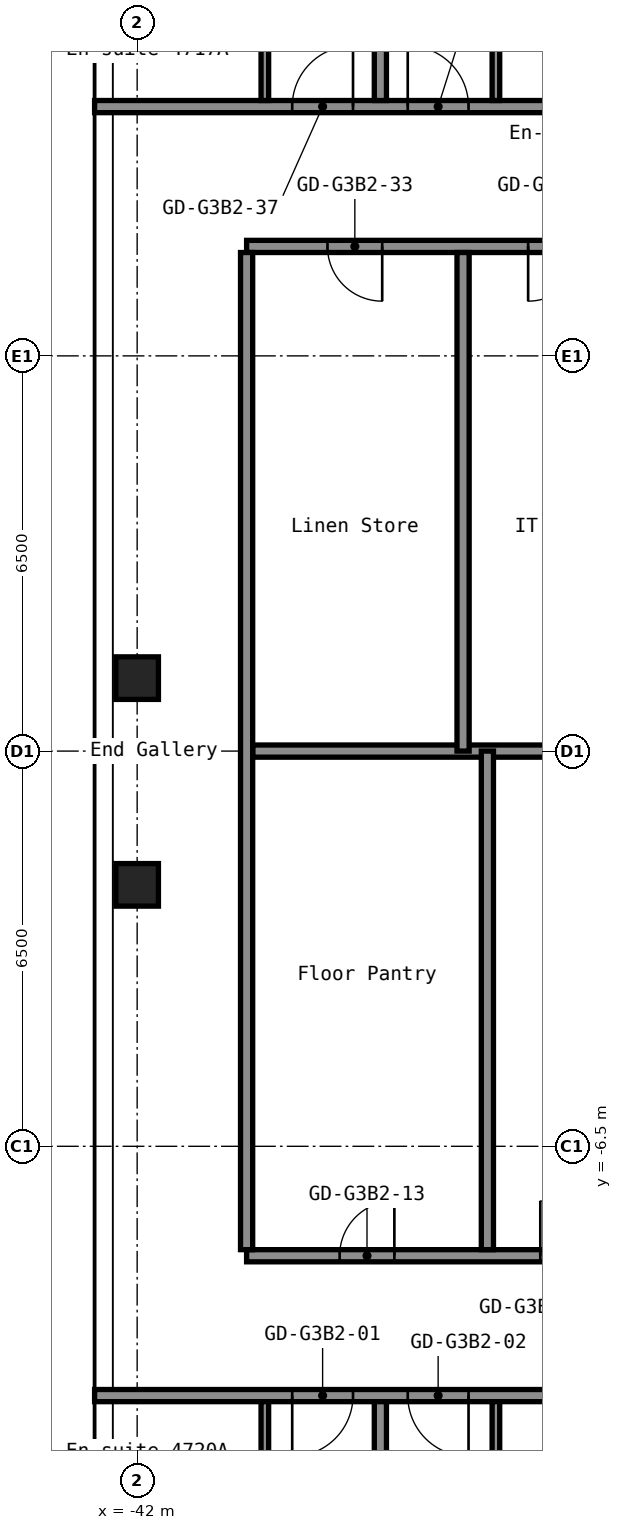
"""IFC4 building model, lengths in metres.
Left out: names, types, materials, properties, quantities, classifications, styles, units other than length and angle.
Written with IfcOpenShell. Run it as: python <this file> out.ifc"""

import sys

from ifc_helpers import new_model, si_unit, direction, frame, frame_2d, origin, origin_2d, place, context, subcontext, project, spatial, rectangle, hollow_rectangle, extrude, element, fill, save


model = new_model("IFC4")
c1 = context("Model", 3, precision=1e-05, world=origin(), true_north=direction((0.0, 1.0)))
c2 = subcontext(c1, "Body", "Model", "MODEL_VIEW")
j1 = project(units=[si_unit("LENGTHUNIT", "METRE"), si_unit("PLANEANGLEUNIT", "RADIAN")], contexts=[c1])
p1 = place(None, origin())
s1 = spatial("IfcSite", under=j1, at=p1, CompositionType="ELEMENT")
p2 = place(p1, origin())
s2 = spatial("IfcBuilding", under=s1, at=p2, CompositionType="ELEMENT")
p3 = place(p2, frame((0.0, 0.0, 166.2)))
s3 = spatial("IfcBuildingStorey", under=s2, at=p3, CompositionType="ELEMENT", Elevation=166.2)
for number, where, z_axis, x_axis in (
    (1, (-42.0, -2.2, 0.0), (0.0, 0.0, 1.0), (1.0, 0.0, 0.0)),
    (2, (-42.0, 1.2, 0.0), (0.0, 0.0, 1.0), (1.0, 0.0, 0.0)),
):
    element("IfcColumn", number, at=place(p3, frame(where, z_axis=z_axis, x_axis=x_axis)), inside=s3, PredefinedType="COLUMN", context=c2, shape_type="SweptSolid", body=[
        extrude(hollow_rectangle(XDim=0.7, YDim=0.7, WallThickness=0.028, at=origin_2d()), origin(), (0.0, 0.0, 1.0), 2.75),
    ])
p4 = place(p3, frame((-42.7, -10.6, 0.0), z_axis=(0.0, 0.0, 1.0), x_axis=(1.0, 0.0, 0.0)))
e3 = element("IfcWall", 3, at=p4, inside=s3, PredefinedType="PARTITIONING", context=c2, shape_type="SweptSolid", body=[
    extrude(rectangle(XDim=25.9, YDim=0.2, at=frame_2d((12.95, 0.0))), origin(), (0.0, 0.0, 1.0), 2.75),
])
p5 = place(p4, frame((3.25, 0.0, 0.0)))
e4 = element("IfcOpeningElement", 4, at=p5, cuts=e3, PredefinedType="OPENING", context=c2, shape_type="SweptSolid", body=[
    extrude(rectangle(XDim=1.0, YDim=2.1, at=frame_2d((0.5, 1.05))), frame((0.0, 0.11, 0.0), z_axis=(0.0, -1.0, 0.0), x_axis=(1.0, 0.0, 0.0)), (0.0, 0.0, 1.0), 0.22),
])
p6 = place(p4, frame((5.15, 0.0, 0.0)))
e5 = element("IfcOpeningElement", 5, at=p6, cuts=e3, PredefinedType="OPENING", context=c2, shape_type="SweptSolid", body=[
    extrude(rectangle(XDim=1.0, YDim=2.1, at=frame_2d((0.5, 1.05))), frame((0.0, 0.11, 0.0), z_axis=(0.0, -1.0, 0.0), x_axis=(1.0, 0.0, 0.0)), (0.0, 0.0, 1.0), 0.22),
])
p7 = place(p4, frame((11.95, 0.0, 0.0)))
e6 = element("IfcOpeningElement", 6, at=p7, cuts=e3, PredefinedType="OPENING", context=c2, shape_type="SweptSolid", body=[
    extrude(rectangle(XDim=1.0, YDim=2.1, at=frame_2d((0.5, 1.05))), frame((0.0, 0.11, 0.0), z_axis=(0.0, -1.0, 0.0), x_axis=(1.0, 0.0, 0.0)), (0.0, 0.0, 1.0), 0.22),
])
p8 = place(p4, frame((13.65, 0.0, 0.0)))
e7 = element("IfcOpeningElement", 7, at=p8, cuts=e3, PredefinedType="OPENING", context=c2, shape_type="SweptSolid", body=[
    extrude(rectangle(XDim=1.0, YDim=2.1, at=frame_2d((0.5, 1.05))), frame((0.0, 0.11, 0.0), z_axis=(0.0, -1.0, 0.0), x_axis=(1.0, 0.0, 0.0)), (0.0, 0.0, 1.0), 0.22),
])
p9 = place(p4, frame((20.35, 0.0, 0.0)))
e8 = element("IfcOpeningElement", 8, at=p9, cuts=e3, PredefinedType="OPENING", context=c2, shape_type="SweptSolid", body=[
    extrude(rectangle(XDim=1.0, YDim=2.1, at=frame_2d((0.5, 1.05))), frame((0.0, 0.11, 0.0), z_axis=(0.0, -1.0, 0.0), x_axis=(1.0, 0.0, 0.0)), (0.0, 0.0, 1.0), 0.22),
])
p10 = place(p4, frame((22.05, 0.0, 0.0)))
e9 = element("IfcOpeningElement", 9, at=p10, cuts=e3, PredefinedType="OPENING", context=c2, shape_type="SweptSolid", body=[
    extrude(rectangle(XDim=1.0, YDim=2.1, at=frame_2d((0.5, 1.05))), frame((0.0, 0.11, 0.0), z_axis=(0.0, -1.0, 0.0), x_axis=(1.0, 0.0, 0.0)), (0.0, 0.0, 1.0), 0.22),
])
p11 = place(p3, frame((-40.2, -8.3, 0.0), z_axis=(0.0, 0.0, 1.0), x_axis=(1.0, 0.0, 0.0)))
e10 = element("IfcWall", 10, at=p11, inside=s3, PredefinedType="PARTITIONING", context=c2, shape_type="SweptSolid", body=[
    extrude(rectangle(XDim=6.6, YDim=0.2, at=frame_2d((3.3, 0.0))), origin(), (0.0, 0.0, 1.0), 2.75),
])
p12 = place(p11, frame((1.53, 0.0, 0.0)))
e11 = element("IfcOpeningElement", 11, at=p12, cuts=e10, PredefinedType="OPENING", context=c2, shape_type="SweptSolid", body=[
    extrude(rectangle(XDim=0.9, YDim=2.1, at=frame_2d((0.45, 1.05))), frame((0.0, 0.11, 0.0), z_axis=(0.0, -1.0, 0.0), x_axis=(1.0, 0.0, 0.0)), (0.0, 0.0, 1.0), 0.22),
])
p13 = place(p11, frame((4.83, 0.0, 0.0)))
e12 = element("IfcOpeningElement", 12, at=p13, cuts=e10, PredefinedType="OPENING", context=c2, shape_type="SweptSolid", body=[
    extrude(rectangle(XDim=0.9, YDim=2.1, at=frame_2d((0.45, 1.05))), frame((0.0, 0.11, 0.0), z_axis=(0.0, -1.0, 0.0), x_axis=(1.0, 0.0, 0.0)), (0.0, 0.0, 1.0), 0.22),
])
p14 = place(p3, frame((-40.1, 0.0, 0.0), z_axis=(0.0, 0.0, 1.0), x_axis=(1.0, 0.0, 0.0)))
e13 = element("IfcWall", 13, at=p14, inside=s3, PredefinedType="PARTITIONING", context=c2, shape_type="SweptSolid", body=[
    extrude(rectangle(XDim=6.5, YDim=0.2, at=frame_2d((3.25, 0.0))), origin(), (0.0, 0.0, 1.0), 2.75),
])
p15 = place(p3, frame((-40.2, 8.3, 0.0), z_axis=(0.0, 0.0, 1.0), x_axis=(1.0, 0.0, 0.0)))
e14 = element("IfcWall", 14, at=p15, inside=s3, PredefinedType="PARTITIONING", context=c2, shape_type="SweptSolid", body=[
    extrude(rectangle(XDim=6.6, YDim=0.2, at=frame_2d((3.3, 0.0))), origin(), (0.0, 0.0, 1.0), 2.75),
])
p16 = place(p15, frame((1.33, 0.0, 0.0)))
e15 = element("IfcOpeningElement", 15, at=p16, cuts=e14, PredefinedType="OPENING", context=c2, shape_type="SweptSolid", body=[
    extrude(rectangle(XDim=0.9, YDim=2.1, at=frame_2d((0.45, 1.05))), frame((0.0, 0.11, 0.0), z_axis=(0.0, -1.0, 0.0), x_axis=(1.0, 0.0, 0.0)), (0.0, 0.0, 1.0), 0.22),
])
p17 = place(p15, frame((4.63, 0.0, 0.0)))
e16 = element("IfcOpeningElement", 16, at=p17, cuts=e14, PredefinedType="OPENING", context=c2, shape_type="SweptSolid", body=[
    extrude(rectangle(XDim=0.9, YDim=2.1, at=frame_2d((0.45, 1.05))), frame((0.0, 0.11, 0.0), z_axis=(0.0, -1.0, 0.0), x_axis=(1.0, 0.0, 0.0)), (0.0, 0.0, 1.0), 0.22),
])
p18 = place(p3, frame((-42.7, 10.6, 0.0), z_axis=(0.0, 0.0, 1.0), x_axis=(1.0, 0.0, 0.0)))
e17 = element("IfcWall", 17, at=p18, inside=s3, PredefinedType="PARTITIONING", context=c2, shape_type="SweptSolid", body=[
    extrude(rectangle(XDim=25.9, YDim=0.2, at=frame_2d((12.95, 0.0))), origin(), (0.0, 0.0, 1.0), 2.75),
])
p19 = place(p18, frame((3.25, 0.0, 0.0)))
e18 = element("IfcOpeningElement", 18, at=p19, cuts=e17, PredefinedType="OPENING", context=c2, shape_type="SweptSolid", body=[
    extrude(rectangle(XDim=1.0, YDim=2.1, at=frame_2d((0.5, 1.05))), frame((0.0, 0.11, 0.0), z_axis=(0.0, -1.0, 0.0), x_axis=(1.0, 0.0, 0.0)), (0.0, 0.0, 1.0), 0.22),
])
p20 = place(p18, frame((5.15, 0.0, 0.0)))
e19 = element("IfcOpeningElement", 19, at=p20, cuts=e17, PredefinedType="OPENING", context=c2, shape_type="SweptSolid", body=[
    extrude(rectangle(XDim=1.0, YDim=2.1, at=frame_2d((0.5, 1.05))), frame((0.0, 0.11, 0.0), z_axis=(0.0, -1.0, 0.0), x_axis=(1.0, 0.0, 0.0)), (0.0, 0.0, 1.0), 0.22),
])
p21 = place(p18, frame((11.95, 0.0, 0.0)))
e20 = element("IfcOpeningElement", 20, at=p21, cuts=e17, PredefinedType="OPENING", context=c2, shape_type="SweptSolid", body=[
    extrude(rectangle(XDim=1.0, YDim=2.1, at=frame_2d((0.5, 1.05))), frame((0.0, 0.11, 0.0), z_axis=(0.0, -1.0, 0.0), x_axis=(1.0, 0.0, 0.0)), (0.0, 0.0, 1.0), 0.22),
])
p22 = place(p18, frame((13.65, 0.0, 0.0)))
e21 = element("IfcOpeningElement", 21, at=p22, cuts=e17, PredefinedType="OPENING", context=c2, shape_type="SweptSolid", body=[
    extrude(rectangle(XDim=1.0, YDim=2.1, at=frame_2d((0.5, 1.05))), frame((0.0, 0.11, 0.0), z_axis=(0.0, -1.0, 0.0), x_axis=(1.0, 0.0, 0.0)), (0.0, 0.0, 1.0), 0.22),
])
p23 = place(p18, frame((20.35, 0.0, 0.0)))
e22 = element("IfcOpeningElement", 22, at=p23, cuts=e17, PredefinedType="OPENING", context=c2, shape_type="SweptSolid", body=[
    extrude(rectangle(XDim=1.0, YDim=2.1, at=frame_2d((0.5, 1.05))), frame((0.0, 0.11, 0.0), z_axis=(0.0, -1.0, 0.0), x_axis=(1.0, 0.0, 0.0)), (0.0, 0.0, 1.0), 0.22),
])
p24 = place(p18, frame((22.05, 0.0, 0.0)))
e23 = element("IfcOpeningElement", 23, at=p24, cuts=e17, PredefinedType="OPENING", context=c2, shape_type="SweptSolid", body=[
    extrude(rectangle(XDim=1.0, YDim=2.1, at=frame_2d((0.5, 1.05))), frame((0.0, 0.11, 0.0), z_axis=(0.0, -1.0, 0.0), x_axis=(1.0, 0.0, 0.0)), (0.0, 0.0, 1.0), 0.22),
])
p25 = place(p3, frame((-40.2, -8.2, 0.0), z_axis=(0.0, 0.0, 1.0), x_axis=(0.0, 1.0, 0.0)))
e24 = element("IfcWall", 24, at=p25, inside=s3, PredefinedType="PARTITIONING", context=c2, shape_type="SweptSolid", body=[
    extrude(rectangle(XDim=16.4, YDim=0.2, at=frame_2d((8.2, 0.0))), origin(), (0.0, 0.0, 1.0), 2.75),
])
p26 = place(p3, frame((-39.9, -13.6, 0.0), z_axis=(0.0, 0.0, 1.0), x_axis=(0.0, 1.0, 0.0)))
e25 = element("IfcWall", 25, at=p26, inside=s3, PredefinedType="PARTITIONING", context=c2, shape_type="SweptSolid", body=[
    extrude(rectangle(XDim=2.9, YDim=0.125, at=frame_2d((1.45, 0.0))), origin(), (0.0, 0.0, 1.0), 2.75),
])
p27 = place(p26, frame((0.6, 0.0, 0.0)))
e26 = element("IfcOpeningElement", 26, at=p27, cuts=e25, PredefinedType="OPENING", context=c2, shape_type="SweptSolid", body=[
    extrude(rectangle(XDim=0.8, YDim=2.1, at=frame_2d((0.4, 1.05))), frame((0.0, 0.073, 0.0), z_axis=(0.0, -1.0, 0.0), x_axis=(1.0, 0.0, 0.0)), (0.0, 0.0, 1.0), 0.145),
])
p28 = place(p3, frame((-39.9, 10.7, 0.0), z_axis=(0.0, 0.0, 1.0), x_axis=(0.0, 1.0, 0.0)))
e27 = element("IfcWall", 27, at=p28, inside=s3, PredefinedType="PARTITIONING", context=c2, shape_type="SweptSolid", body=[
    extrude(rectangle(XDim=2.9, YDim=0.125, at=frame_2d((1.45, 0.0))), origin(), (0.0, 0.0, 1.0), 2.75),
])
p29 = place(p28, frame((1.5, 0.0, 0.0)))
e28 = element("IfcOpeningElement", 28, at=p29, cuts=e27, PredefinedType="OPENING", context=c2, shape_type="SweptSolid", body=[
    extrude(rectangle(XDim=0.8, YDim=2.1, at=frame_2d((0.4, 1.05))), frame((0.0, 0.073, 0.0), z_axis=(0.0, -1.0, 0.0), x_axis=(1.0, 0.0, 0.0)), (0.0, 0.0, 1.0), 0.145),
])
p30 = place(p3, frame((-38.0, -19.3, 0.0), z_axis=(0.0, 0.0, 1.0), x_axis=(0.0, 1.0, 0.0)))
e29 = element("IfcWall", 29, at=p30, inside=s3, PredefinedType="PARTITIONING", context=c2, shape_type="SweptSolid", body=[
    extrude(rectangle(XDim=8.6, YDim=0.2, at=frame_2d((4.3, 0.0))), origin(), (0.0, 0.0, 1.0), 2.75),
])
p31 = place(p3, frame((-38.0, 10.7, 0.0), z_axis=(0.0, 0.0, 1.0), x_axis=(0.0, 1.0, 0.0)))
e30 = element("IfcWall", 30, at=p31, inside=s3, PredefinedType="PARTITIONING", context=c2, shape_type="SweptSolid", body=[
    extrude(rectangle(XDim=7.6, YDim=0.2, at=frame_2d((3.8, 0.0))), origin(), (0.0, 0.0, 1.0), 2.75),
])
for number, where, z_axis, x_axis in (
    (31, (-36.64, 0.0, 0.0), (0.0, 0.0, 1.0), (0.0, 1.0, 0.0)),
    (32, (-36.24, -8.2, 0.0), (0.0, 0.0, 1.0), (0.0, 1.0, 0.0)),
):
    element("IfcWall", number, at=place(p3, frame(where, z_axis=z_axis, x_axis=x_axis)), inside=s3, PredefinedType="PARTITIONING", context=c2, shape_type="SweptSolid", body=[
        extrude(rectangle(XDim=8.2, YDim=0.2, at=frame_2d((4.1, 0.0))), origin(), (0.0, 0.0, 1.0), 2.75),
    ])
p32 = place(p3, frame((-36.1, -13.6, 0.0), z_axis=(0.0, 0.0, 1.0), x_axis=(0.0, 1.0, 0.0)))
e33 = element("IfcWall", 33, at=p32, inside=s3, PredefinedType="PARTITIONING", context=c2, shape_type="SweptSolid", body=[
    extrude(rectangle(XDim=2.9, YDim=0.125, at=frame_2d((1.45, 0.0))), origin(), (0.0, 0.0, 1.0), 2.75),
])
p33 = place(p32, frame((0.6, 0.0, 0.0)))
e34 = element("IfcOpeningElement", 34, at=p33, cuts=e33, PredefinedType="OPENING", context=c2, shape_type="SweptSolid", body=[
    extrude(rectangle(XDim=0.8, YDim=2.1, at=frame_2d((0.4, 1.05))), frame((0.0, 0.073, 0.0), z_axis=(0.0, -1.0, 0.0), x_axis=(1.0, 0.0, 0.0)), (0.0, 0.0, 1.0), 0.145),
])
p34 = place(p3, frame((-36.1, 10.7, 0.0), z_axis=(0.0, 0.0, 1.0), x_axis=(0.0, 1.0, 0.0)))
e35 = element("IfcWall", 35, at=p34, inside=s3, PredefinedType="PARTITIONING", context=c2, shape_type="SweptSolid", body=[
    extrude(rectangle(XDim=2.9, YDim=0.125, at=frame_2d((1.45, 0.0))), origin(), (0.0, 0.0, 1.0), 2.75),
])
p35 = place(p34, frame((1.5, 0.0, 0.0)))
e36 = element("IfcOpeningElement", 36, at=p35, cuts=e35, PredefinedType="OPENING", context=c2, shape_type="SweptSolid", body=[
    extrude(rectangle(XDim=0.8, YDim=2.1, at=frame_2d((0.4, 1.05))), frame((0.0, 0.073, 0.0), z_axis=(0.0, -1.0, 0.0), x_axis=(1.0, 0.0, 0.0)), (0.0, 0.0, 1.0), 0.145),
])
p36 = place(p5, origin())
e37 = element("IfcDoor", 37, at=p36, inside=s3, OperationType="SINGLE_SWING_LEFT", PredefinedType="DOOR", context=c2, shape_type="SweptSolid", body=[
    extrude(rectangle(XDim=1.0, YDim=2.1, at=frame_2d((0.5, 1.05))), frame((0.0, 0.025, 0.0), z_axis=(0.0, -1.0, 0.0), x_axis=(1.0, 0.0, 0.0)), (0.0, 0.0, 1.0), 0.05),
])
fill(e4, e37)
p37 = place(p6, origin())
e38 = element("IfcDoor", 38, at=p37, inside=s3, OperationType="SINGLE_SWING_RIGHT", PredefinedType="DOOR", context=c2, shape_type="SweptSolid", body=[
    extrude(rectangle(XDim=1.0, YDim=2.1, at=frame_2d((0.5, 1.05))), frame((0.0, 0.025, 0.0), z_axis=(0.0, -1.0, 0.0), x_axis=(1.0, 0.0, 0.0)), (0.0, 0.0, 1.0), 0.05),
])
fill(e5, e38)
p38 = place(p12, origin())
e39 = element("IfcDoor", 39, at=p38, inside=s3, OperationType="SINGLE_SWING_LEFT", PredefinedType="DOOR", context=c2, shape_type="SweptSolid", body=[
    extrude(rectangle(XDim=0.9, YDim=2.1, at=frame_2d((0.45, 1.05))), frame((0.0, 0.025, 0.0), z_axis=(0.0, -1.0, 0.0), x_axis=(1.0, 0.0, 0.0)), (0.0, 0.0, 1.0), 0.05),
])
fill(e11, e39)
p39 = place(p13, origin())
e40 = element("IfcDoor", 40, at=p39, inside=s3, OperationType="SINGLE_SWING_RIGHT", PredefinedType="DOOR", context=c2, shape_type="SweptSolid", body=[
    extrude(rectangle(XDim=0.9, YDim=2.1, at=frame_2d((0.45, 1.05))), frame((0.0, 0.025, 0.0), z_axis=(0.0, -1.0, 0.0), x_axis=(1.0, 0.0, 0.0)), (0.0, 0.0, 1.0), 0.05),
])
fill(e12, e40)
p40 = place(p16, origin())
e41 = element("IfcDoor", 41, at=p40, inside=s3, OperationType="SINGLE_SWING_RIGHT", PredefinedType="DOOR", context=c2, shape_type="SweptSolid", body=[
    extrude(rectangle(XDim=0.9, YDim=2.1, at=frame_2d((0.45, 1.05))), frame((0.0, 0.025, 0.0), z_axis=(0.0, -1.0, 0.0), x_axis=(1.0, 0.0, 0.0)), (0.0, 0.0, 1.0), 0.05),
])
fill(e15, e41)
p41 = place(p17, origin())
e42 = element("IfcDoor", 42, at=p41, inside=s3, OperationType="SINGLE_SWING_LEFT", PredefinedType="DOOR", context=c2, shape_type="SweptSolid", body=[
    extrude(rectangle(XDim=0.9, YDim=2.1, at=frame_2d((0.45, 1.05))), frame((0.0, 0.025, 0.0), z_axis=(0.0, -1.0, 0.0), x_axis=(1.0, 0.0, 0.0)), (0.0, 0.0, 1.0), 0.05),
])
fill(e16, e42)
p42 = place(p19, origin())
e43 = element("IfcDoor", 43, at=p42, inside=s3, OperationType="SINGLE_SWING_LEFT", PredefinedType="DOOR", context=c2, shape_type="SweptSolid", body=[
    extrude(rectangle(XDim=1.0, YDim=2.1, at=frame_2d((0.5, 1.05))), frame((0.0, 0.025, 0.0), z_axis=(0.0, -1.0, 0.0), x_axis=(1.0, 0.0, 0.0)), (0.0, 0.0, 1.0), 0.05),
])
fill(e18, e43)
p43 = place(p20, origin())
e44 = element("IfcDoor", 44, at=p43, inside=s3, OperationType="SINGLE_SWING_RIGHT", PredefinedType="DOOR", context=c2, shape_type="SweptSolid", body=[
    extrude(rectangle(XDim=1.0, YDim=2.1, at=frame_2d((0.5, 1.05))), frame((0.0, 0.025, 0.0), z_axis=(0.0, -1.0, 0.0), x_axis=(1.0, 0.0, 0.0)), (0.0, 0.0, 1.0), 0.05),
])
fill(e19, e44)
save(model, sys.argv[1])
